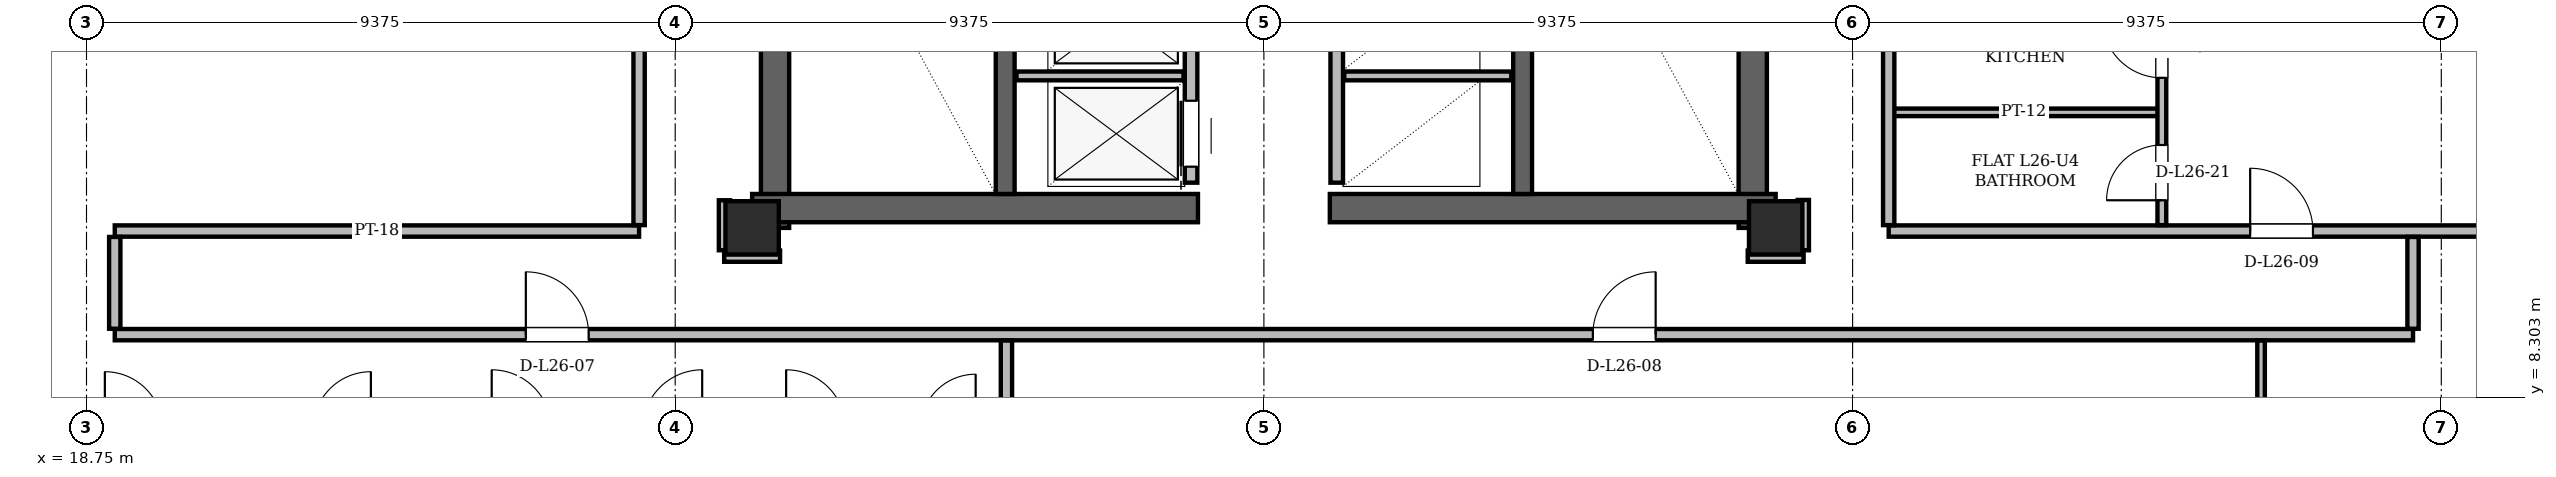
"""IFC4 building model, lengths in metres.
Left out: names, types, materials, properties, quantities, classifications, styles, units other than length and angle.
Written with IfcOpenShell. Run it as: python <this file> out.ifc"""

import sys

from ifc_helpers import new_model, si_unit, direction, frame, frame_2d, origin, origin_2d, place, context, subcontext, project, spatial, rectangle, hollow_rectangle, extrude, element, fill, save


model = new_model("IFC4")
c1 = context("Model", 3, precision=1e-05, world=origin(), true_north=direction((0.0, 1.0)))
c2 = subcontext(c1, "Body", "Model", "MODEL_VIEW")
j1 = project(units=[si_unit("LENGTHUNIT", "METRE"), si_unit("PLANEANGLEUNIT", "RADIAN")], contexts=[c1])
p1 = place(None, origin())
s1 = spatial("IfcSite", under=j1, at=p1, CompositionType="ELEMENT")
p2 = place(p1, origin())
s2 = spatial("IfcBuilding", under=s1, at=p2, CompositionType="ELEMENT")
p3 = place(p2, frame((0.0, 0.0, 100.5)))
s3 = spatial("IfcBuildingStorey", under=s2, at=p3, CompositionType="ELEMENT", Elevation=100.5)
for number, where, z_axis, x_axis in (
    (1, (29.35, 11.0, 0.0), (0.0, 0.0, 1.0), (1.0, 0.0, 0.0)),
    (2, (45.65, 11.0, 0.0), (0.0, 0.0, 1.0), (1.0, 0.0, 0.0)),
):
    element("IfcColumn", number, at=place(p3, frame(where, z_axis=z_axis, x_axis=x_axis)), inside=s3, PredefinedType="COLUMN", context=c2, shape_type="SweptSolid", body=[
        extrude(hollow_rectangle(XDim=0.85, YDim=0.85, WallThickness=0.07, at=origin_2d()), origin(), (0.0, 0.0, 1.0), 3.6),
    ])
for number, where, z_axis, x_axis in (
    (3, (29.715, 11.0, 0.0), (0.0, 0.0, 1.0), (0.0, 1.0, 0.0)),
    (4, (45.285, 11.0, 0.0), (0.0, 0.0, 1.0), (0.0, 1.0, 0.0)),
):
    element("IfcWall", number, at=place(p3, frame(where, z_axis=z_axis, x_axis=x_axis)), inside=s3, PredefinedType="SHEAR", context=c2, shape_type="SweptSolid", body=[
        extrude(rectangle(XDim=13.3, YDim=0.45, at=frame_2d((6.65, 0.0))), origin(), (0.0, 0.0, 1.0), 3.36),
    ])
for number, where, z_axis, x_axis in (
    (5, (29.35, 11.315, 0.0), (0.0, 0.0, 1.0), (1.0, 0.0, 0.0)),
    (6, (38.55, 11.315, 0.0), (0.0, 0.0, 1.0), (1.0, 0.0, 0.0)),
):
    element("IfcWall", number, at=place(p3, frame(where, z_axis=z_axis, x_axis=x_axis)), inside=s3, PredefinedType="SHEAR", context=c2, shape_type="SweptSolid", body=[
        extrude(rectangle(XDim=7.1, YDim=0.45, at=frame_2d((3.55, 0.0))), origin(), (0.0, 0.0, 1.0), 3.36),
    ])
for number, where, z_axis, x_axis in (
    (7, (33.38, 11.54, 0.0), (0.0, 0.0, 1.0), (0.0, 1.0, 0.0)),
    (8, (41.62, 11.54, 0.0), (0.0, 0.0, 1.0), (0.0, 1.0, 0.0)),
):
    element("IfcWall", number, at=place(p3, frame(where, z_axis=z_axis, x_axis=x_axis)), inside=s3, PredefinedType="SHEAR", context=c2, shape_type="SweptSolid", body=[
        extrude(rectangle(XDim=7.62, YDim=0.3, at=frame_2d((3.81, 0.0))), origin(), (0.0, 0.0, 1.0), 3.36),
    ])
p4 = place(p3, frame((14.31, 13.561, 0.0), z_axis=(0.0, 0.0, 1.0), x_axis=(0.4999967785, -0.866027263711, 0.0)))
e9 = element("IfcWall", 9, at=p4, inside=s3, PredefinedType="SOLIDWALL", context=c2, shape_type="SweptSolid", body=[
    extrude(rectangle(XDim=11.864, YDim=0.34, at=frame_2d((5.932, 0.0))), origin(), (0.0, 0.0, 1.0), 2.578),
])
p5 = place(p4, frame((10.241, 0.0, 1.28)))
e10 = element("IfcOpeningElement", 10, at=p5, cuts=e9, PredefinedType="OPENING", context=c2, shape_type="SweptSolid", body=[
    extrude(rectangle(XDim=0.85, YDim=0.92, at=frame_2d((0.425, 0.46))), frame((0.0, 0.17, 0.0), z_axis=(0.0, -1.0, 0.0), x_axis=(1.0, 0.0, 0.0)), (0.0, 0.0, 1.0), 0.34),
])
p6 = place(p3, frame((54.758, 3.286, 0.0), z_axis=(0.0, 0.0, 1.0), x_axis=(0.4999967785, 0.866027263711, 0.0)))
e11 = element("IfcWall", 11, at=p6, inside=s3, PredefinedType="SOLIDWALL", context=c2, shape_type="SweptSolid", body=[
    extrude(rectangle(XDim=11.864, YDim=0.34, at=frame_2d((5.932, 0.0))), origin(), (0.0, 0.0, 1.0), 2.578),
])
p7 = place(p3, frame((60.69, 13.561, 0.0), z_axis=(0.0, 0.0, 1.0), x_axis=(-0.500002056916, 0.86602421622, 0.0)))
e12 = element("IfcWall", 12, at=p7, inside=s3, PredefinedType="SOLIDWALL", context=c2, shape_type="SweptSolid", body=[
    extrude(rectangle(XDim=34.516, YDim=0.34, at=frame_2d((17.258, 0.0))), origin(), (0.0, 0.0, 1.0), 2.578),
])
p8 = place(p7, frame((8.034, 0.0, 0.0)))
e13 = element("IfcOpeningElement", 13, at=p8, cuts=e12, PredefinedType="OPENING", context=c2, shape_type="SweptSolid", body=[
    extrude(rectangle(XDim=1.5, YDim=2.2, at=frame_2d((0.75, 1.1))), frame((0.0, 0.17, 0.0), z_axis=(0.0, -1.0, 0.0), x_axis=(1.0, 0.0, 0.0)), (0.0, 0.0, 1.0), 0.34),
])
p9 = place(p7, frame((26.647, 0.0, 0.0)))
e14 = element("IfcOpeningElement", 14, at=p9, cuts=e12, PredefinedType="OPENING", context=c2, shape_type="SweptSolid", body=[
    extrude(rectangle(XDim=1.5, YDim=2.2, at=frame_2d((0.75, 1.1))), frame((0.0, 0.17, 0.0), z_axis=(0.0, -1.0, 0.0), x_axis=(1.0, 0.0, 0.0)), (0.0, 0.0, 1.0), 0.34),
])
p10 = place(p7, frame((1.477, 0.0, 0.85)))
e15 = element("IfcOpeningElement", 15, at=p10, cuts=e12, PredefinedType="OPENING", context=c2, shape_type="SweptSolid", body=[
    extrude(rectangle(XDim=2.5, YDim=1.618, at=frame_2d((1.25, 0.809))), frame((0.0, 0.17, 0.0), z_axis=(0.0, -1.0, 0.0), x_axis=(1.0, 0.0, 0.0)), (0.0, 0.0, 1.0), 0.34),
])
p11 = place(p7, frame((16.107, 0.0, 0.85)))
e16 = element("IfcOpeningElement", 16, at=p11, cuts=e12, PredefinedType="OPENING", context=c2, shape_type="SweptSolid", body=[
    extrude(rectangle(XDim=1.4, YDim=1.6, at=frame_2d((0.7, 0.8))), frame((0.0, 0.17, 0.0), z_axis=(0.0, -1.0, 0.0), x_axis=(1.0, 0.0, 0.0)), (0.0, 0.0, 1.0), 0.34),
])
p12 = place(p7, frame((30.693, 0.0, 0.85)))
e17 = element("IfcOpeningElement", 17, at=p12, cuts=e12, PredefinedType="OPENING", context=c2, shape_type="SweptSolid", body=[
    extrude(rectangle(XDim=2.5, YDim=1.618, at=frame_2d((1.25, 0.809))), frame((0.0, 0.17, 0.0), z_axis=(0.0, -1.0, 0.0), x_axis=(1.0, 0.0, 0.0)), (0.0, 0.0, 1.0), 0.34),
])
p13 = place(p3, frame((31.568, 43.453, 0.0), z_axis=(0.0, 0.0, 1.0), x_axis=(-0.500002056916, -0.86602421622, 0.0)))
e18 = element("IfcWall", 18, at=p13, inside=s3, PredefinedType="SOLIDWALL", context=c2, shape_type="SweptSolid", body=[
    extrude(rectangle(XDim=34.516, YDim=0.34, at=frame_2d((17.258, 0.0))), origin(), (0.0, 0.0, 1.0), 2.578),
])
p14 = place(p13, frame((8.034, 0.0, 0.0)))
e19 = element("IfcOpeningElement", 19, at=p14, cuts=e18, PredefinedType="OPENING", context=c2, shape_type="SweptSolid", body=[
    extrude(rectangle(XDim=1.5, YDim=2.2, at=frame_2d((0.75, 1.1))), frame((0.0, 0.17, 0.0), z_axis=(0.0, -1.0, 0.0), x_axis=(1.0, 0.0, 0.0)), (0.0, 0.0, 1.0), 0.34),
])
p15 = place(p13, frame((26.647, 0.0, 0.0)))
e20 = element("IfcOpeningElement", 20, at=p15, cuts=e18, PredefinedType="OPENING", context=c2, shape_type="SweptSolid", body=[
    extrude(rectangle(XDim=1.5, YDim=2.2, at=frame_2d((0.75, 1.1))), frame((0.0, 0.17, 0.0), z_axis=(0.0, -1.0, 0.0), x_axis=(1.0, 0.0, 0.0)), (0.0, 0.0, 1.0), 0.34),
])
p16 = place(p13, frame((31.672, 0.0, 0.85)))
e21 = element("IfcOpeningElement", 21, at=p16, cuts=e18, PredefinedType="OPENING", context=c2, shape_type="SweptSolid", body=[
    extrude(rectangle(XDim=1.6, YDim=1.618, at=frame_2d((0.8, 0.809))), frame((0.0, 0.17, 0.0), z_axis=(0.0, -1.0, 0.0), x_axis=(1.0, 0.0, 0.0)), (0.0, 0.0, 1.0), 0.34),
])
p17 = place(p13, frame((11.262, 0.0, 0.85)))
e22 = element("IfcOpeningElement", 22, at=p17, cuts=e18, PredefinedType="OPENING", context=c2, shape_type="SweptSolid", body=[
    extrude(rectangle(XDim=1.8, YDim=1.618, at=frame_2d((0.9, 0.809))), frame((0.0, 0.17, 0.0), z_axis=(0.0, -1.0, 0.0), x_axis=(1.0, 0.0, 0.0)), (0.0, 0.0, 1.0), 0.34),
])
p18 = place(p13, frame((18.602, 0.0, 0.85)))
e23 = element("IfcOpeningElement", 23, at=p18, cuts=e18, PredefinedType="OPENING", context=c2, shape_type="SweptSolid", body=[
    extrude(rectangle(XDim=1.2, YDim=1.48, at=frame_2d((0.6, 0.74))), frame((0.0, 0.17, 0.0), z_axis=(0.0, -1.0, 0.0), x_axis=(1.0, 0.0, 0.0)), (0.0, 0.0, 1.0), 0.34),
])
p19 = place(p13, frame((1.763, 0.0, 0.85)))
e24 = element("IfcOpeningElement", 24, at=p19, cuts=e18, PredefinedType="OPENING", context=c2, shape_type="SweptSolid", body=[
    extrude(rectangle(XDim=1.6, YDim=1.618, at=frame_2d((0.8, 0.809))), frame((0.0, 0.17, 0.0), z_axis=(0.0, -1.0, 0.0), x_axis=(1.0, 0.0, 0.0)), (0.0, 0.0, 1.0), 0.34),
])
p20 = place(p3, frame((36.34, 11.72, 0.0), z_axis=(0.0, 0.0, 1.0), x_axis=(0.0, 1.0, 0.0)))
e25 = element("IfcWall", 25, at=p20, inside=s3, PredefinedType="PARTITIONING", context=c2, shape_type="SweptSolid", body=[
    extrude(rectangle(XDim=7.6, YDim=0.2, at=frame_2d((3.8, 0.0))), origin(), (0.0, 0.0, 1.0), 3.36),
])
p21 = place(p20, frame((0.255, 0.0, 0.0)))
e26 = element("IfcOpeningElement", 26, at=p21, cuts=e25, PredefinedType="OPENING", context=c2, shape_type="SweptSolid", body=[
    extrude(rectangle(XDim=1.05, YDim=2.15, at=frame_2d((0.525, 1.075))), frame((0.0, 0.1, 0.0), z_axis=(0.0, -1.0, 0.0), x_axis=(1.0, 0.0, 0.0)), (0.0, 0.0, 1.0), 0.2),
])
p22 = place(p20, frame((2.105, 0.0, 0.0)))
e27 = element("IfcOpeningElement", 27, at=p22, cuts=e25, PredefinedType="OPENING", context=c2, shape_type="SweptSolid", body=[
    extrude(rectangle(XDim=1.05, YDim=2.15, at=frame_2d((0.525, 1.075))), frame((0.0, 0.1, 0.0), z_axis=(0.0, -1.0, 0.0), x_axis=(1.0, 0.0, 0.0)), (0.0, 0.0, 1.0), 0.2),
])
p23 = place(p20, frame((3.955, 0.0, 0.0)))
e28 = element("IfcOpeningElement", 28, at=p23, cuts=e25, PredefinedType="OPENING", context=c2, shape_type="SweptSolid", body=[
    extrude(rectangle(XDim=1.05, YDim=2.15, at=frame_2d((0.525, 1.075))), frame((0.0, 0.1, 0.0), z_axis=(0.0, -1.0, 0.0), x_axis=(1.0, 0.0, 0.0)), (0.0, 0.0, 1.0), 0.2),
])
p24 = place(p3, frame((33.56, 13.42, 0.0), z_axis=(0.0, 0.0, 1.0), x_axis=(1.0, 0.0, 0.0)))
e29 = element("IfcWall", 29, at=p24, inside=s3, PredefinedType="PARTITIONING", context=c2, shape_type="SweptSolid", body=[
    extrude(rectangle(XDim=2.66, YDim=0.14, at=frame_2d((1.33, 0.0))), origin(), (0.0, 0.0, 1.0), 3.36),
])
p25 = place(p3, frame((38.66, 11.72, 0.0), z_axis=(0.0, 0.0, 1.0), x_axis=(0.0, 1.0, 0.0)))
e30 = element("IfcWall", 30, at=p25, inside=s3, PredefinedType="PARTITIONING", context=c2, shape_type="SweptSolid", body=[
    extrude(rectangle(XDim=9.1, YDim=0.2, at=frame_2d((4.55, 0.0))), origin(), (0.0, 0.0, 1.0), 3.36),
])
p26 = place(p3, frame((38.78, 13.42, 0.0), z_axis=(0.0, 0.0, 1.0), x_axis=(1.0, 0.0, 0.0)))
e31 = element("IfcWall", 31, at=p26, inside=s3, PredefinedType="PARTITIONING", context=c2, shape_type="SweptSolid", body=[
    extrude(rectangle(XDim=2.66, YDim=0.14, at=frame_2d((1.33, 0.0))), origin(), (0.0, 0.0, 1.0), 3.36),
])
p27 = place(p3, frame((19.2, 9.3, 0.0), z_axis=(0.0, 0.0, 1.0), x_axis=(1.0, 0.0, 0.0)))
e32 = element("IfcWall", 32, at=p27, inside=s3, PredefinedType="PARTITIONING", context=c2, shape_type="SweptSolid", body=[
    extrude(rectangle(XDim=36.6, YDim=0.18, at=frame_2d((18.3, 0.0))), origin(), (0.0, 0.0, 1.0), 2.814),
])
p28 = place(p27, frame((6.546, 0.0, 0.0)))
e33 = element("IfcOpeningElement", 33, at=p28, cuts=e32, PredefinedType="OPENING", context=c2, shape_type="SweptSolid", body=[
    extrude(rectangle(XDim=1.0, YDim=2.18, at=frame_2d((0.5, 1.09))), frame((0.0, 0.09, 0.0), z_axis=(0.0, -1.0, 0.0), x_axis=(1.0, 0.0, 0.0)), (0.0, 0.0, 1.0), 0.18),
])
p29 = place(p27, frame((23.539, 0.0, 0.0)))
e34 = element("IfcOpeningElement", 34, at=p29, cuts=e32, PredefinedType="OPENING", context=c2, shape_type="SweptSolid", body=[
    extrude(rectangle(XDim=1.0, YDim=2.18, at=frame_2d((0.5, 1.09))), frame((0.0, 0.09, 0.0), z_axis=(0.0, -1.0, 0.0), x_axis=(1.0, 0.0, 0.0)), (0.0, 0.0, 1.0), 0.18),
])
for number, where, z_axis, x_axis in (
    (35, (28.905, 10.55, 0.0), (0.0, 0.0, 1.0), (1.0, 0.0, 0.0)),
    (36, (45.205, 10.55, 0.0), (0.0, 0.0, 1.0), (1.0, 0.0, 0.0)),
):
    element("IfcWall", number, at=place(p3, frame(where, z_axis=z_axis, x_axis=x_axis)), inside=s3, PredefinedType="PARTITIONING", context=c2, shape_type="SweptSolid", body=[
        extrude(rectangle(XDim=0.89, YDim=0.18, at=frame_2d((0.445, 0.0))), origin(), (0.0, 0.0, 1.0), 3.36),
    ])
p30 = place(p3, frame((19.2, 10.95, 0.0), z_axis=(0.0, 0.0, 1.0), x_axis=(1.0, 0.0, 0.0)))
e37 = element("IfcWall", 37, at=p30, inside=s3, PredefinedType="PARTITIONING", context=c2, shape_type="SweptSolid", body=[
    extrude(rectangle(XDim=8.35, YDim=0.18, at=frame_2d((4.175, 0.0))), origin(), (0.0, 0.0, 1.0), 3.36),
])
p31 = place(p3, frame((47.45, 10.95, 0.0), z_axis=(0.0, 0.0, 1.0), x_axis=(1.0, 0.0, 0.0)))
e38 = element("IfcWall", 38, at=p31, inside=s3, PredefinedType="PARTITIONING", context=c2, shape_type="SweptSolid", body=[
    extrude(rectangle(XDim=11.532, YDim=0.18, at=frame_2d((5.766, 0.0))), origin(), (0.0, 0.0, 1.0), 3.36),
])
p32 = place(p31, frame((5.756, 0.0, 0.0)))
e39 = element("IfcOpeningElement", 39, at=p32, cuts=e38, PredefinedType="OPENING", context=c2, shape_type="SweptSolid", body=[
    extrude(rectangle(XDim=1.0, YDim=2.18, at=frame_2d((0.5, 1.09))), frame((0.0, 0.09, 0.0), z_axis=(0.0, -1.0, 0.0), x_axis=(1.0, 0.0, 0.0)), (0.0, 0.0, 1.0), 0.18),
])
p33 = place(p3, frame((47.4, 12.84, 0.0), z_axis=(0.0, 0.0, 1.0), x_axis=(1.0, 0.0, 0.0)))
e40 = element("IfcWall", 40, at=p33, inside=s3, PredefinedType="PARTITIONING", context=c2, shape_type="SweptSolid", body=[
    extrude(rectangle(XDim=4.4, YDim=0.12, at=frame_2d((2.2, 0.0))), origin(), (0.0, 0.0, 1.0), 3.36),
])
p34 = place(p3, frame((19.2, 9.394, 0.0), z_axis=(0.0, 0.0, 1.0), x_axis=(0.0, 1.0, 0.0)))
e41 = element("IfcWall", 41, at=p34, inside=s3, PredefinedType="PARTITIONING", context=c2, shape_type="SweptSolid", body=[
    extrude(rectangle(XDim=1.462, YDim=0.18, at=frame_2d((0.731, 0.0))), origin(), (0.0, 0.0, 1.0), 3.36),
])
p35 = place(p3, frame((27.55, 11.044, 0.0), z_axis=(0.0, 0.0, 1.0), x_axis=(0.0, 1.0, 0.0)))
e42 = element("IfcWall", 42, at=p35, inside=s3, PredefinedType="PARTITIONING", context=c2, shape_type="SweptSolid", body=[
    extrude(rectangle(XDim=14.832, YDim=0.18, at=frame_2d((7.416, 0.0))), origin(), (0.0, 0.0, 1.0), 2.814),
])
p36 = place(p35, frame((9.795, 0.0, 0.0)))
e43 = element("IfcOpeningElement", 43, at=p36, cuts=e42, PredefinedType="OPENING", context=c2, shape_type="SweptSolid", body=[
    extrude(rectangle(XDim=1.0, YDim=2.18, at=frame_2d((0.5, 1.09))), frame((0.0, 0.09, 0.0), z_axis=(0.0, -1.0, 0.0), x_axis=(1.0, 0.0, 0.0)), (0.0, 0.0, 1.0), 0.18),
])
p37 = place(p3, frame((28.91, 10.644, 0.0), z_axis=(0.0, 0.0, 1.0), x_axis=(0.0, 1.0, 0.0)))
e44 = element("IfcWall", 44, at=p37, inside=s3, PredefinedType="PARTITIONING", context=c2, shape_type="SweptSolid", body=[
    extrude(rectangle(XDim=0.796, YDim=0.18, at=frame_2d((0.398, 0.0))), origin(), (0.0, 0.0, 1.0), 2.814),
])
p38 = place(p3, frame((33.4, 3.46, 0.0), z_axis=(0.0, 0.0, 1.0), x_axis=(0.0, 1.0, 0.0)))
e45 = element("IfcWall", 45, at=p38, inside=s3, PredefinedType="PARTITIONING", context=c2, shape_type="SweptSolid", body=[
    extrude(rectangle(XDim=5.746, YDim=0.18, at=frame_2d((2.873, 0.0))), origin(), (0.0, 0.0, 1.0), 3.36),
])
p39 = place(p3, frame((46.09, 10.644, 0.0), z_axis=(0.0, 0.0, 1.0), x_axis=(0.0, 1.0, 0.0)))
e46 = element("IfcWall", 46, at=p39, inside=s3, PredefinedType="PARTITIONING", context=c2, shape_type="SweptSolid", body=[
    extrude(rectangle(XDim=0.801, YDim=0.18, at=frame_2d((0.4, 0.0))), origin(), (0.0, 0.0, 1.0), 2.814),
])
p40 = place(p3, frame((47.45, 11.044, 0.0), z_axis=(0.0, 0.0, 1.0), x_axis=(0.0, 1.0, 0.0)))
e47 = element("IfcWall", 47, at=p40, inside=s3, PredefinedType="PARTITIONING", context=c2, shape_type="SweptSolid", body=[
    extrude(rectangle(XDim=14.832, YDim=0.18, at=frame_2d((7.416, 0.0))), origin(), (0.0, 0.0, 1.0), 2.814),
])
p41 = place(p3, frame((51.8, 11.044, 0.0), z_axis=(0.0, 0.0, 1.0), x_axis=(0.0, 1.0, 0.0)))
e48 = element("IfcWall", 48, at=p41, inside=s3, PredefinedType="PARTITIONING", context=c2, shape_type="SweptSolid", body=[
    extrude(rectangle(XDim=13.182, YDim=0.14, at=frame_2d((6.591, 0.0))), origin(), (0.0, 0.0, 1.0), 2.814),
])
p42 = place(p41, frame((0.396, 0.0, 0.0)))
e49 = element("IfcOpeningElement", 49, at=p42, cuts=e48, PredefinedType="OPENING", context=c2, shape_type="SweptSolid", body=[
    extrude(rectangle(XDim=0.88, YDim=2.08, at=frame_2d((0.44, 1.04))), frame((0.0, 0.07, 0.0), z_axis=(0.0, -1.0, 0.0), x_axis=(1.0, 0.0, 0.0)), (0.0, 0.0, 1.0), 0.14),
])
p43 = place(p41, frame((2.346, 0.0, 0.0)))
e50 = element("IfcOpeningElement", 50, at=p43, cuts=e48, PredefinedType="OPENING", context=c2, shape_type="SweptSolid", body=[
    extrude(rectangle(XDim=0.95, YDim=2.1, at=frame_2d((0.475, 1.05))), frame((0.0, 0.07, 0.0), z_axis=(0.0, -1.0, 0.0), x_axis=(1.0, 0.0, 0.0)), (0.0, 0.0, 1.0), 0.14),
])
p44 = place(p41, frame((8.116, 0.0, 0.0)))
e51 = element("IfcOpeningElement", 51, at=p44, cuts=e48, PredefinedType="OPENING", context=c2, shape_type="SweptSolid", body=[
    extrude(rectangle(XDim=0.92, YDim=2.12, at=frame_2d((0.46, 1.06))), frame((0.0, 0.07, 0.0), z_axis=(0.0, -1.0, 0.0), x_axis=(1.0, 0.0, 0.0)), (0.0, 0.0, 1.0), 0.14),
])
p45 = place(p3, frame((53.38, 3.46, 0.0), z_axis=(0.0, 0.0, 1.0), x_axis=(0.0, 1.0, 0.0)))
e52 = element("IfcWall", 52, at=p45, inside=s3, PredefinedType="PARTITIONING", context=c2, shape_type="SweptSolid", body=[
    extrude(rectangle(XDim=5.746, YDim=0.12, at=frame_2d((2.873, 0.0))), origin(), (0.0, 0.0, 1.0), 2.814),
])
p46 = place(p45, frame((2.468, 0.0, 0.0)))
e53 = element("IfcOpeningElement", 53, at=p46, cuts=e52, PredefinedType="OPENING", context=c2, shape_type="SweptSolid", body=[
    extrude(rectangle(XDim=0.88, YDim=2.08, at=frame_2d((0.44, 1.04))), frame((0.0, 0.06, 0.0), z_axis=(0.0, -1.0, 0.0), x_axis=(1.0, 0.0, 0.0)), (0.0, 0.0, 1.0), 0.12),
])
p47 = place(p3, frame((55.8, 9.394, 0.0), z_axis=(0.0, 0.0, 1.0), x_axis=(0.0, 1.0, 0.0)))
e54 = element("IfcWall", 54, at=p47, inside=s3, PredefinedType="PARTITIONING", context=c2, shape_type="SweptSolid", body=[
    extrude(rectangle(XDim=1.462, YDim=0.18, at=frame_2d((0.731, 0.0))), origin(), (0.0, 0.0, 1.0), 3.36),
])
p48 = place(p21, origin())
e55 = element("IfcDoor", 55, at=p48, inside=s3, OperationType="SLIDING_TO_LEFT", PredefinedType="DOOR", context=c2, shape_type="SweptSolid", body=[
    extrude(rectangle(XDim=1.05, YDim=2.15, at=frame_2d((0.525, 1.075))), frame((0.0, 0.025, 0.0), z_axis=(0.0, -1.0, 0.0), x_axis=(1.0, 0.0, 0.0)), (0.0, 0.0, 1.0), 0.05),
])
fill(e26, e55)
p49 = place(p28, origin())
e56 = element("IfcDoor", 56, at=p49, inside=s3, OperationType="SINGLE_SWING_LEFT", PredefinedType="DOOR", context=c2, shape_type="SweptSolid", body=[
    extrude(rectangle(XDim=1.0, YDim=2.18, at=frame_2d((0.5, 1.09))), frame((0.0, 0.025, 0.0), z_axis=(0.0, -1.0, 0.0), x_axis=(1.0, 0.0, 0.0)), (0.0, 0.0, 1.0), 0.05),
])
fill(e33, e56)
p50 = place(p29, origin())
e57 = element("IfcDoor", 57, at=p50, inside=s3, OperationType="SINGLE_SWING_RIGHT", PredefinedType="DOOR", context=c2, shape_type="SweptSolid", body=[
    extrude(rectangle(XDim=1.0, YDim=2.18, at=frame_2d((0.5, 1.09))), frame((0.0, 0.025, 0.0), z_axis=(0.0, -1.0, 0.0), x_axis=(1.0, 0.0, 0.0)), (0.0, 0.0, 1.0), 0.05),
])
fill(e34, e57)
p51 = place(p32, origin())
e58 = element("IfcDoor", 58, at=p51, inside=s3, OperationType="SINGLE_SWING_LEFT", PredefinedType="DOOR", context=c2, shape_type="SweptSolid", body=[
    extrude(rectangle(XDim=1.0, YDim=2.18, at=frame_2d((0.5, 1.09))), frame((0.0, 0.025, 0.0), z_axis=(0.0, -1.0, 0.0), x_axis=(1.0, 0.0, 0.0)), (0.0, 0.0, 1.0), 0.05),
])
fill(e39, e58)
p52 = place(p42, origin())
e59 = element("IfcDoor", 59, at=p52, inside=s3, OperationType="SINGLE_SWING_LEFT", PredefinedType="DOOR", context=c2, shape_type="SweptSolid", body=[
    extrude(rectangle(XDim=0.88, YDim=2.08, at=frame_2d((0.44, 1.04))), frame((0.0, 0.025, 0.0), z_axis=(0.0, -1.0, 0.0), x_axis=(1.0, 0.0, 0.0)), (0.0, 0.0, 1.0), 0.05),
])
fill(e49, e59)
p53 = place(p43, origin())
e60 = element("IfcDoor", 60, at=p53, inside=s3, OperationType="SINGLE_SWING_RIGHT", PredefinedType="DOOR", context=c2, shape_type="SweptSolid", body=[
    extrude(rectangle(XDim=0.95, YDim=2.1, at=frame_2d((0.475, 1.05))), frame((0.0, 0.025, 0.0), z_axis=(0.0, -1.0, 0.0), x_axis=(1.0, 0.0, 0.0)), (0.0, 0.0, 1.0), 0.05),
])
fill(e50, e60)
save(model, sys.argv[1])
